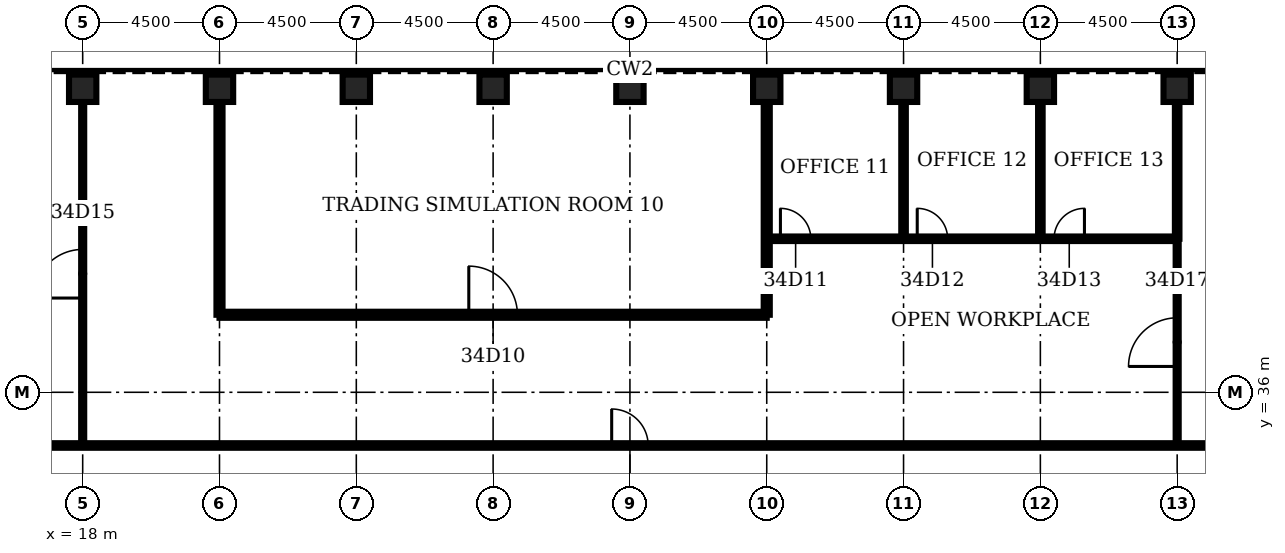
"""IFC4 building model, lengths in metres.
Left out: names, types, materials, properties, quantities, classifications, styles, units other than length and angle.
Written with IfcOpenShell. Run it as: python <this file> out.ifc"""

import sys

from ifc_helpers import new_model, si_unit, direction, frame, frame_2d, origin, origin_2d, place, context, subcontext, project, spatial, rectangle, hollow_rectangle, extrude, element, fill, save


model = new_model("IFC4")
c1 = context("Model", 3, precision=1e-05, world=origin(), true_north=direction((0.0, 1.0)))
c2 = subcontext(c1, "Body", "Model", "MODEL_VIEW")
j1 = project(units=[si_unit("LENGTHUNIT", "METRE"), si_unit("PLANEANGLEUNIT", "RADIAN")], contexts=[c1])
p1 = place(None, origin())
s1 = spatial("IfcSite", under=j1, at=p1, CompositionType="ELEMENT")
p2 = place(p1, origin())
s2 = spatial("IfcBuilding", under=s1, at=p2, CompositionType="ELEMENT")
p3 = place(p2, frame((0.0, 0.0, 155.1)))
s3 = spatial("IfcBuildingStorey", under=s2, at=p3, CompositionType="ELEMENT", Elevation=155.1)
for number, where, z_axis, x_axis in (
    (1, (54.0, 46.0, 0.0), (0.0, 0.0, 1.0), (0.0, 1.0, 0.0)),
    (2, (49.5, 46.0, 0.0), (0.0, 0.0, 1.0), (0.0, 1.0, 0.0)),
    (3, (45.0, 46.0, 0.0), (0.0, 0.0, 1.0), (0.0, 1.0, 0.0)),
    (4, (40.5, 46.0, 0.0), (0.0, 0.0, 1.0), (0.0, 1.0, 0.0)),
    (5, (36.0, 46.0, 0.0), (0.0, 0.0, 1.0), (0.0, 1.0, 0.0)),
    (6, (31.5, 46.0, 0.0), (0.0, 0.0, 1.0), (0.0, 1.0, 0.0)),
    (7, (27.0, 46.0, 0.0), (0.0, 0.0, 1.0), (0.0, 1.0, 0.0)),
    (8, (22.5, 46.0, 0.0), (0.0, 0.0, 1.0), (0.0, 1.0, 0.0)),
    (9, (18.0, 46.0, 0.0), (0.0, 0.0, 1.0), (0.0, 1.0, 0.0)),
):
    element("IfcColumn", number, at=place(p3, frame(where, z_axis=z_axis, x_axis=x_axis)), inside=s3, PredefinedType="COLUMN", context=c2, shape_type="SweptSolid", body=[
        extrude(hollow_rectangle(XDim=0.9, YDim=0.9, WallThickness=0.1, at=origin_2d()), origin(), (0.0, 0.0, 1.0), 4.2),
    ])
p4 = place(p3, frame((15.15, 34.25, 0.0), z_axis=(0.0, 0.0, 1.0), x_axis=(1.0, 0.0, 0.0)))
e10 = element("IfcWall", 10, at=p4, inside=s3, PredefinedType="PARTITIONING", context=c2, shape_type="SweptSolid", body=[
    extrude(rectangle(XDim=41.7, YDim=0.15, at=frame_2d((20.85, 0.0))), origin(), (0.0, 0.0, 1.0), 3.0),
])
p5 = place(p4, frame((20.25, 0.0, 0.0)))
e11 = element("IfcOpeningElement", 11, at=p5, cuts=e10, PredefinedType="OPENING", context=c2, shape_type="SweptSolid", body=[
    extrude(rectangle(XDim=1.2, YDim=2.1, at=frame_2d((0.6, 1.05))), frame((0.0, 0.085, 0.0), z_axis=(0.0, -1.0, 0.0), x_axis=(1.0, 0.0, 0.0)), (0.0, 0.0, 1.0), 0.17),
])
p6 = place(p3, frame((22.5, 38.55, 0.0), z_axis=(0.0, 0.0, 1.0), x_axis=(1.0, 0.0, 0.0)))
e12 = element("IfcWall", 12, at=p6, inside=s3, PredefinedType="PARTITIONING", context=c2, shape_type="SweptSolid", body=[
    extrude(rectangle(XDim=18.0, YDim=0.2, at=frame_2d((9.0, 0.0))), origin(), (0.0, 0.0, 1.0), 3.0),
])
p7 = place(p6, frame((8.2, 0.0, 0.0)))
e13 = element("IfcOpeningElement", 13, at=p7, cuts=e12, PredefinedType="OPENING", context=c2, shape_type="SweptSolid", body=[
    extrude(rectangle(XDim=1.6, YDim=2.1, at=frame_2d((0.8, 1.05))), frame((0.0, 0.11, 0.0), z_axis=(0.0, -1.0, 0.0), x_axis=(1.0, 0.0, 0.0)), (0.0, 0.0, 1.0), 0.22),
])
p8 = place(p3, frame((40.5, 41.05, 0.0), z_axis=(0.0, 0.0, 1.0), x_axis=(1.0, 0.0, 0.0)))
e14 = element("IfcWall", 14, at=p8, inside=s3, PredefinedType="PARTITIONING", context=c2, shape_type="SweptSolid", body=[
    extrude(rectangle(XDim=13.5, YDim=0.15, at=frame_2d((6.75, 0.0))), origin(), (0.0, 0.0, 1.0), 3.0),
])
p9 = place(p8, frame((0.45, 0.0, 0.0)))
e15 = element("IfcOpeningElement", 15, at=p9, cuts=e14, PredefinedType="OPENING", context=c2, shape_type="SweptSolid", body=[
    extrude(rectangle(XDim=1.0, YDim=2.1, at=frame_2d((0.5, 1.05))), frame((0.0, 0.085, 0.0), z_axis=(0.0, -1.0, 0.0), x_axis=(1.0, 0.0, 0.0)), (0.0, 0.0, 1.0), 0.17),
])
p10 = place(p8, frame((4.95, 0.0, 0.0)))
e16 = element("IfcOpeningElement", 16, at=p10, cuts=e14, PredefinedType="OPENING", context=c2, shape_type="SweptSolid", body=[
    extrude(rectangle(XDim=1.0, YDim=2.1, at=frame_2d((0.5, 1.05))), frame((0.0, 0.085, 0.0), z_axis=(0.0, -1.0, 0.0), x_axis=(1.0, 0.0, 0.0)), (0.0, 0.0, 1.0), 0.17),
])
p11 = place(p8, frame((9.45, 0.0, 0.0)))
e17 = element("IfcOpeningElement", 17, at=p11, cuts=e14, PredefinedType="OPENING", context=c2, shape_type="SweptSolid", body=[
    extrude(rectangle(XDim=1.0, YDim=2.1, at=frame_2d((0.5, 1.05))), frame((0.0, 0.085, 0.0), z_axis=(0.0, -1.0, 0.0), x_axis=(1.0, 0.0, 0.0)), (0.0, 0.0, 1.0), 0.17),
])
p12 = place(p3, frame((18.0, 34.25, 0.0), z_axis=(0.0, 0.0, 1.0), x_axis=(0.0, 1.0, 0.0)))
e18 = element("IfcWall", 18, at=p12, inside=s3, PredefinedType="PARTITIONING", context=c2, shape_type="SweptSolid", body=[
    extrude(rectangle(XDim=11.3, YDim=0.1, at=frame_2d((5.65, 0.0))), origin(), (0.0, 0.0, 1.0), 3.0),
])
p13 = place(p12, frame((4.85, 0.0, 0.0)))
e19 = element("IfcOpeningElement", 19, at=p13, cuts=e18, PredefinedType="OPENING", context=c2, shape_type="SweptSolid", body=[
    extrude(rectangle(XDim=1.6, YDim=2.1, at=frame_2d((0.8, 1.05))), frame((0.0, 0.06, 0.0), z_axis=(0.0, -1.0, 0.0), x_axis=(1.0, 0.0, 0.0)), (0.0, 0.0, 1.0), 0.12),
])
for number, where, z_axis, x_axis in (
    (20, (22.5, 38.55, 0.0), (0.0, 0.0, 1.0), (0.0, 1.0, 0.0)),
    (21, (40.5, 38.55, 0.0), (0.0, 0.0, 1.0), (0.0, 1.0, 0.0)),
):
    element("IfcWall", number, at=place(p3, frame(where, z_axis=z_axis, x_axis=x_axis)), inside=s3, PredefinedType="PARTITIONING", context=c2, shape_type="SweptSolid", body=[
        extrude(rectangle(XDim=7.0, YDim=0.2, at=frame_2d((3.5, 0.0))), origin(), (0.0, 0.0, 1.0), 3.0),
    ])
for number, where, z_axis, x_axis in (
    (22, (45.0, 41.05, 0.0), (0.0, 0.0, 1.0), (0.0, 1.0, 0.0)),
    (23, (49.5, 41.05, 0.0), (0.0, 0.0, 1.0), (0.0, 1.0, 0.0)),
):
    element("IfcWall", number, at=place(p3, frame(where, z_axis=z_axis, x_axis=x_axis)), inside=s3, PredefinedType="PARTITIONING", context=c2, shape_type="SweptSolid", body=[
        extrude(rectangle(XDim=4.5, YDim=0.15, at=frame_2d((2.25, 0.0))), origin(), (0.0, 0.0, 1.0), 3.0),
    ])
p14 = place(p3, frame((54.0, 34.25, 0.0), z_axis=(0.0, 0.0, 1.0), x_axis=(0.0, 1.0, 0.0)))
e24 = element("IfcWall", 24, at=p14, inside=s3, PredefinedType="PARTITIONING", context=c2, shape_type="SweptSolid", body=[
    extrude(rectangle(XDim=6.8, YDim=0.1, at=frame_2d((3.4, 0.0))), origin(), (0.0, 0.0, 1.0), 3.0),
])
p15 = place(p14, frame((2.6, 0.0, 0.0)))
e25 = element("IfcOpeningElement", 25, at=p15, cuts=e24, PredefinedType="OPENING", context=c2, shape_type="SweptSolid", body=[
    extrude(rectangle(XDim=1.6, YDim=2.1, at=frame_2d((0.8, 1.05))), frame((0.0, 0.06, 0.0), z_axis=(0.0, -1.0, 0.0), x_axis=(1.0, 0.0, 0.0)), (0.0, 0.0, 1.0), 0.12),
])
p16 = place(p3, frame((54.0, 41.05, 0.0), z_axis=(0.0, 0.0, 1.0), x_axis=(0.0, 1.0, 0.0)))
e26 = element("IfcWall", 26, at=p16, inside=s3, PredefinedType="PARTITIONING", context=c2, shape_type="SweptSolid", body=[
    extrude(rectangle(XDim=4.5, YDim=0.15, at=frame_2d((2.25, 0.0))), origin(), (0.0, 0.0, 1.0), 3.0),
])
p17 = place(p7, origin())
e27 = element("IfcDoor", 27, at=p17, inside=s3, OperationType="SINGLE_SWING_LEFT", PredefinedType="DOOR", context=c2, shape_type="SweptSolid", body=[
    extrude(rectangle(XDim=1.6, YDim=2.1, at=frame_2d((0.8, 1.05))), frame((0.0, 0.025, 0.0), z_axis=(0.0, -1.0, 0.0), x_axis=(1.0, 0.0, 0.0)), (0.0, 0.0, 1.0), 0.05),
])
fill(e13, e27)
p18 = place(p9, origin())
e28 = element("IfcDoor", 28, at=p18, inside=s3, OperationType="SINGLE_SWING_LEFT", PredefinedType="DOOR", context=c2, shape_type="SweptSolid", body=[
    extrude(rectangle(XDim=1.0, YDim=2.1, at=frame_2d((0.5, 1.05))), frame((0.0, 0.025, 0.0), z_axis=(0.0, -1.0, 0.0), x_axis=(1.0, 0.0, 0.0)), (0.0, 0.0, 1.0), 0.05),
])
fill(e15, e28)
p19 = place(p10, origin())
e29 = element("IfcDoor", 29, at=p19, inside=s3, OperationType="SINGLE_SWING_LEFT", PredefinedType="DOOR", context=c2, shape_type="SweptSolid", body=[
    extrude(rectangle(XDim=1.0, YDim=2.1, at=frame_2d((0.5, 1.05))), frame((0.0, 0.025, 0.0), z_axis=(0.0, -1.0, 0.0), x_axis=(1.0, 0.0, 0.0)), (0.0, 0.0, 1.0), 0.05),
])
fill(e16, e29)
p20 = place(p11, origin())
e30 = element("IfcDoor", 30, at=p20, inside=s3, OperationType="SINGLE_SWING_RIGHT", PredefinedType="DOOR", context=c2, shape_type="SweptSolid", body=[
    extrude(rectangle(XDim=1.0, YDim=2.1, at=frame_2d((0.5, 1.05))), frame((0.0, 0.025, 0.0), z_axis=(0.0, -1.0, 0.0), x_axis=(1.0, 0.0, 0.0)), (0.0, 0.0, 1.0), 0.05),
])
fill(e17, e30)
p21 = place(p13, origin())
e31 = element("IfcDoor", 31, at=p21, inside=s3, OperationType="SINGLE_SWING_LEFT", PredefinedType="DOOR", context=c2, shape_type="SweptSolid", body=[
    extrude(rectangle(XDim=1.6, YDim=2.1, at=frame_2d((0.8, 1.05))), frame((0.0, 0.025, 0.0), z_axis=(0.0, -1.0, 0.0), x_axis=(1.0, 0.0, 0.0)), (0.0, 0.0, 1.0), 0.05),
])
fill(e19, e31)
p22 = place(p15, origin())
e32 = element("IfcDoor", 32, at=p22, inside=s3, OperationType="SINGLE_SWING_LEFT", PredefinedType="DOOR", context=c2, shape_type="SweptSolid", body=[
    extrude(rectangle(XDim=1.6, YDim=2.1, at=frame_2d((0.8, 1.05))), frame((0.0, 0.025, 0.0), z_axis=(0.0, -1.0, 0.0), x_axis=(1.0, 0.0, 0.0)), (0.0, 0.0, 1.0), 0.05),
])
fill(e25, e32)
p23 = place(p5, origin())
e33 = element("IfcDoor", 33, at=p23, inside=s3, OperationType="SINGLE_SWING_LEFT", PredefinedType="DOOR", context=c2, shape_type="SweptSolid", body=[
    extrude(rectangle(XDim=1.2, YDim=2.1, at=frame_2d((0.6, 1.05))), frame((0.0, 0.025, 0.0), z_axis=(0.0, -1.0, 0.0), x_axis=(1.0, 0.0, 0.0)), (0.0, 0.0, 1.0), 0.05),
])
fill(e11, e33)
save(model, sys.argv[1])
